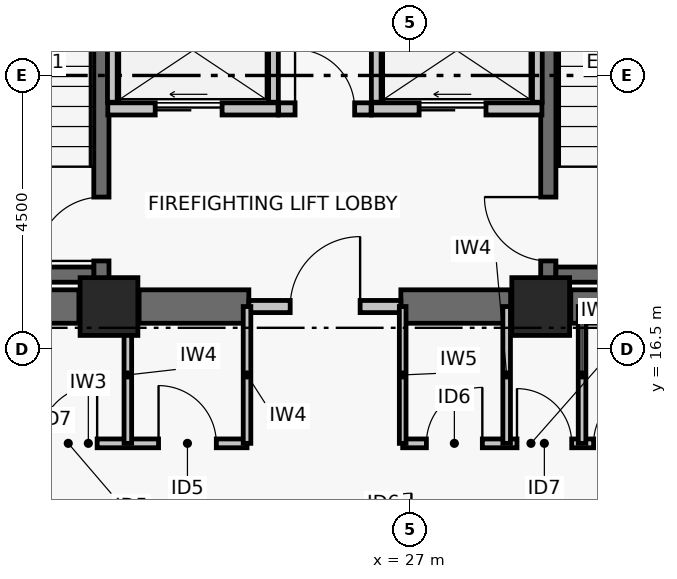
"""IFC4 building model, lengths in metres.
Left out: names, types, materials, properties, quantities, classifications, styles, units other than length and angle.
Written with IfcOpenShell. Run it as: python <this file> out.ifc"""

import sys

from ifc_helpers import new_model, si_unit, direction, frame, frame_2d, origin, origin_2d, place, context, subcontext, project, spatial, rectangle, extrude, element, fill, save


model = new_model("IFC4")
c1 = context("Model", 3, precision=1e-05, world=origin(), true_north=direction((0.0, 1.0)))
c2 = subcontext(c1, "Body", "Model", "MODEL_VIEW")
j1 = project(units=[si_unit("LENGTHUNIT", "METRE"), si_unit("PLANEANGLEUNIT", "RADIAN")], contexts=[c1])
p1 = place(None, origin())
s1 = spatial("IfcSite", under=j1, at=p1, CompositionType="ELEMENT")
p2 = place(p1, origin())
s2 = spatial("IfcBuilding", under=s1, at=p2, CompositionType="ELEMENT")
p3 = place(p2, frame((0.0, 0.0, 165.48)))
s3 = spatial("IfcBuildingStorey", under=s2, at=p3, CompositionType="ELEMENT", Elevation=165.48)
for number, where, z_axis, x_axis in (
    (1, (22.05, 17.2, 0.0), (0.0, 0.0, 1.0), (1.0, 0.0, 0.0)),
    (2, (29.15, 17.2, 0.0), (0.0, 0.0, 1.0), (1.0, 0.0, 0.0)),
):
    element("IfcColumn", number, at=place(p3, frame(where, z_axis=z_axis, x_axis=x_axis)), inside=s3, PredefinedType="COLUMN", context=c2, shape_type="SweptSolid", body=[
        extrude(rectangle(XDim=0.95, YDim=0.95, at=origin_2d()), origin(), (0.0, 0.0, 1.0), 3.72),
    ])
p4 = place(p3, frame((18.295, 17.2, 0.0), z_axis=(0.0, 0.0, 1.0), x_axis=(1.0, 0.0, 0.0)))
e3 = element("IfcWall", 3, at=p4, inside=s3, PredefinedType="SHEAR", context=c2, shape_type="SweptSolid", body=[
    extrude(rectangle(XDim=3.26, YDim=0.55, at=frame_2d((1.63, 0.0))), origin(), (0.0, 0.0, 1.0), 3.5),
])
p5 = place(p3, frame((22.545, 17.2, 0.0), z_axis=(0.0, 0.0, 1.0), x_axis=(1.0, 0.0, 0.0)))
e4 = element("IfcWall", 4, at=p5, inside=s3, PredefinedType="SHEAR", context=c2, shape_type="SweptSolid", body=[
    extrude(rectangle(XDim=1.805, YDim=0.55, at=frame_2d((0.903, 0.0))), origin(), (0.0, 0.0, 1.0), 3.5),
])
p6 = place(p3, frame((26.85, 17.2, 0.0), z_axis=(0.0, 0.0, 1.0), x_axis=(1.0, 0.0, 0.0)))
e5 = element("IfcWall", 5, at=p6, inside=s3, PredefinedType="SHEAR", context=c2, shape_type="SweptSolid", body=[
    extrude(rectangle(XDim=1.805, YDim=0.55, at=frame_2d((0.902, 0.0))), origin(), (0.0, 0.0, 1.0), 3.5),
])
p7 = place(p3, frame((29.645, 17.2, 0.0), z_axis=(0.0, 0.0, 1.0), x_axis=(1.0, 0.0, 0.0)))
e6 = element("IfcWall", 6, at=p7, inside=s3, PredefinedType="SHEAR", context=c2, shape_type="SweptSolid", body=[
    extrude(rectangle(XDim=3.26, YDim=0.55, at=frame_2d((1.63, 0.0))), origin(), (0.0, 0.0, 1.0), 3.5),
])
p8 = place(p3, frame((21.925, 17.6, 0.0), z_axis=(0.0, 0.0, 1.0), x_axis=(0.0, 1.0, 0.0)))
e7 = element("IfcWall", 7, at=p8, inside=s3, PredefinedType="SHEAR", context=c2, shape_type="SweptSolid", body=[
    extrude(rectangle(XDim=8.8, YDim=0.25, at=frame_2d((4.4, 0.0))), origin(), (0.0, 0.0, 1.0), 3.5),
])
p9 = place(p8, frame((0.35, 0.0, 0.0)))
e8 = element("IfcOpeningElement", 8, at=p9, cuts=e7, PredefinedType="OPENING", context=c2, shape_type="SweptSolid", body=[
    extrude(rectangle(XDim=1.05, YDim=2.08, at=frame_2d((0.525, 1.04))), frame((0.0, 0.135, 0.0), z_axis=(0.0, -1.0, 0.0), x_axis=(1.0, 0.0, 0.0)), (0.0, 0.0, 1.0), 0.27),
])
p10 = place(p3, frame((18.329, 17.725, 0.0), z_axis=(0.0, 0.0, 1.0), x_axis=(1.0, 0.0, 0.0)))
e9 = element("IfcWall", 9, at=p10, inside=s3, PredefinedType="SHEAR", context=c2, shape_type="SweptSolid", body=[
    extrude(rectangle(XDim=3.471, YDim=0.25, at=frame_2d((1.735, 0.0))), origin(), (0.0, 0.0, 1.0), 3.5),
])
p11 = place(p3, frame((29.275, 17.6, 0.0), z_axis=(0.0, 0.0, 1.0), x_axis=(0.0, 1.0, 0.0)))
e10 = element("IfcWall", 10, at=p11, inside=s3, PredefinedType="SHEAR", context=c2, shape_type="SweptSolid", body=[
    extrude(rectangle(XDim=8.8, YDim=0.25, at=frame_2d((4.4, 0.0))), origin(), (0.0, 0.0, 1.0), 3.5),
])
p12 = place(p11, frame((0.35, 0.0, 0.0)))
e11 = element("IfcOpeningElement", 11, at=p12, cuts=e10, PredefinedType="OPENING", context=c2, shape_type="SweptSolid", body=[
    extrude(rectangle(XDim=1.05, YDim=2.08, at=frame_2d((0.525, 1.04))), frame((0.0, 0.135, 0.0), z_axis=(0.0, -1.0, 0.0), x_axis=(1.0, 0.0, 0.0)), (0.0, 0.0, 1.0), 0.27),
])
p13 = place(p3, frame((29.4, 17.725, 0.0), z_axis=(0.0, 0.0, 1.0), x_axis=(1.0, 0.0, 0.0)))
e12 = element("IfcWall", 12, at=p13, inside=s3, PredefinedType="SHEAR", context=c2, shape_type="SweptSolid", body=[
    extrude(rectangle(XDim=3.471, YDim=0.25, at=frame_2d((1.736, 0.0))), origin(), (0.0, 0.0, 1.0), 3.5),
])
p14 = place(p3, frame((24.35, 17.2, 0.0), z_axis=(0.0, 0.0, 1.0), x_axis=(1.0, 0.0, 0.0)))
e13 = element("IfcWall", 13, at=p14, inside=s3, PredefinedType="PARTITIONING", context=c2, shape_type="SweptSolid", body=[
    extrude(rectangle(XDim=2.5, YDim=0.2, at=frame_2d((1.25, 0.0))), origin(), (0.0, 0.0, 1.0), 2.63),
])
p15 = place(p14, frame((0.68, 0.0, 0.0)))
e14 = element("IfcOpeningElement", 14, at=p15, cuts=e13, PredefinedType="OPENING", context=c2, shape_type="SweptSolid", body=[
    extrude(rectangle(XDim=1.15, YDim=2.08, at=frame_2d((0.575, 1.04))), frame((0.0, 0.11, 0.0), z_axis=(0.0, -1.0, 0.0), x_axis=(1.0, 0.0, 0.0)), (0.0, 0.0, 1.0), 0.22),
])
p16 = place(p3, frame((24.84, 20.45, 0.0), z_axis=(0.0, 0.0, 1.0), x_axis=(1.0, 0.0, 0.0)))
e15 = element("IfcWall", 15, at=p16, inside=s3, PredefinedType="PARTITIONING", context=c2, shape_type="SweptSolid", body=[
    extrude(rectangle(XDim=1.52, YDim=0.2, at=frame_2d((0.76, 0.0))), origin(), (0.0, 0.0, 1.0), 3.5),
])
p17 = place(p16, frame((0.27, 0.0, 0.0)))
e16 = element("IfcOpeningElement", 16, at=p17, cuts=e15, PredefinedType="OPENING", context=c2, shape_type="SweptSolid", body=[
    extrude(rectangle(XDim=0.98, YDim=2.06, at=frame_2d((0.49, 1.03))), frame((0.0, 0.11, 0.0), z_axis=(0.0, -1.0, 0.0), x_axis=(1.0, 0.0, 0.0)), (0.0, 0.0, 1.0), 0.22),
])
p18 = place(p3, frame((22.03, 20.45, 0.0), z_axis=(0.0, 0.0, 1.0), x_axis=(1.0, 0.0, 0.0)))
e17 = element("IfcWall", 17, at=p18, inside=s3, PredefinedType="PARTITIONING", context=c2, shape_type="SweptSolid", body=[
    extrude(rectangle(XDim=2.8, YDim=0.2, at=frame_2d((1.4, 0.0))), origin(), (0.0, 0.0, 1.0), 3.5),
])
p19 = place(p18, frame((0.78, 0.0, 0.0)))
e18 = element("IfcOpeningElement", 18, at=p19, cuts=e17, PredefinedType="OPENING", context=c2, shape_type="SweptSolid", body=[
    extrude(rectangle(XDim=1.1, YDim=2.08, at=frame_2d((0.55, 1.04))), frame((0.0, 0.11, 0.0), z_axis=(0.0, -1.0, 0.0), x_axis=(1.0, 0.0, 0.0)), (0.0, 0.0, 1.0), 0.22),
])
p20 = place(p3, frame((26.37, 20.45, 0.0), z_axis=(0.0, 0.0, 1.0), x_axis=(1.0, 0.0, 0.0)))
e19 = element("IfcWall", 19, at=p20, inside=s3, PredefinedType="PARTITIONING", context=c2, shape_type="SweptSolid", body=[
    extrude(rectangle(XDim=2.8, YDim=0.2, at=frame_2d((1.4, 0.0))), origin(), (0.0, 0.0, 1.0), 3.5),
])
p21 = place(p20, frame((0.78, 0.0, 0.0)))
e20 = element("IfcOpeningElement", 20, at=p21, cuts=e19, PredefinedType="OPENING", context=c2, shape_type="SweptSolid", body=[
    extrude(rectangle(XDim=1.1, YDim=2.08, at=frame_2d((0.55, 1.04))), frame((0.0, 0.11, 0.0), z_axis=(0.0, -1.0, 0.0), x_axis=(1.0, 0.0, 0.0)), (0.0, 0.0, 1.0), 0.22),
])
for number, where, z_axis, x_axis in (
    (21, (22.105, 20.56, 0.0), (0.0, 0.0, 1.0), (0.0, 1.0, 0.0)),
    (22, (24.755, 20.56, 0.0), (0.0, 0.0, 1.0), (0.0, 1.0, 0.0)),
):
    element("IfcWall", number, at=place(p3, frame(where, z_axis=z_axis, x_axis=x_axis)), inside=s3, PredefinedType="PARTITIONING", context=c2, shape_type="SweptSolid", body=[
        extrude(rectangle(XDim=1.71, YDim=0.16, at=frame_2d((0.855, 0.0))), origin(), (0.0, 0.0, 1.0), 3.5),
    ])
p22 = place(p3, frame((29.095, 20.56, 0.0), z_axis=(0.0, 0.0, 1.0), x_axis=(0.0, 1.0, 0.0)))
e23 = element("IfcWall", 23, at=p22, inside=s3, PredefinedType="PARTITIONING", context=c2, shape_type="SweptSolid", body=[
    extrude(rectangle(XDim=5.45, YDim=0.16, at=frame_2d((2.725, 0.0))), origin(), (0.0, 0.0, 1.0), 3.5),
])
p23 = place(p3, frame((26.445, 20.56, 0.0), z_axis=(0.0, 0.0, 1.0), x_axis=(0.0, 1.0, 0.0)))
e24 = element("IfcWall", 24, at=p23, inside=s3, PredefinedType="PARTITIONING", context=c2, shape_type="SweptSolid", body=[
    extrude(rectangle(XDim=1.71, YDim=0.16, at=frame_2d((0.855, 0.0))), origin(), (0.0, 0.0, 1.0), 3.5),
])
p24 = place(p3, frame((19.1, 14.95, 0.0), z_axis=(0.0, 0.0, 1.0), x_axis=(1.0, 0.0, 0.0)))
e25 = element("IfcWall", 25, at=p24, inside=s3, PredefinedType="PARTITIONING", context=c2, shape_type="SweptSolid", body=[
    extrude(rectangle(XDim=5.22, YDim=0.145, at=frame_2d((2.61, 0.0))), origin(), (0.0, 0.0, 1.0), 2.73),
])
p25 = place(p24, frame((0.2, 0.0, 0.0)))
e26 = element("IfcOpeningElement", 26, at=p25, cuts=e25, PredefinedType="OPENING", context=c2, shape_type="SweptSolid", body=[
    extrude(rectangle(XDim=0.9, YDim=2.02, at=frame_2d((0.45, 1.01))), frame((0.0, 0.083, 0.0), z_axis=(0.0, -1.0, 0.0), x_axis=(1.0, 0.0, 0.0)), (0.0, 0.0, 1.0), 0.165),
])
p26 = place(p24, frame((1.805, 0.0, 0.0)))
e27 = element("IfcOpeningElement", 27, at=p26, cuts=e25, PredefinedType="OPENING", context=c2, shape_type="SweptSolid", body=[
    extrude(rectangle(XDim=0.95, YDim=2.06, at=frame_2d((0.475, 1.03))), frame((0.0, 0.083, 0.0), z_axis=(0.0, -1.0, 0.0), x_axis=(1.0, 0.0, 0.0)), (0.0, 0.0, 1.0), 0.165),
])
p27 = place(p24, frame((3.765, 0.0, 0.0)))
e28 = element("IfcOpeningElement", 28, at=p27, cuts=e25, PredefinedType="OPENING", context=c2, shape_type="SweptSolid", body=[
    extrude(rectangle(XDim=0.95, YDim=2.06, at=frame_2d((0.475, 1.03))), frame((0.0, 0.083, 0.0), z_axis=(0.0, -1.0, 0.0), x_axis=(1.0, 0.0, 0.0)), (0.0, 0.0, 1.0), 0.165),
])
p28 = place(p3, frame((26.88, 14.95, 0.0), z_axis=(0.0, 0.0, 1.0), x_axis=(1.0, 0.0, 0.0)))
e29 = element("IfcWall", 29, at=p28, inside=s3, PredefinedType="PARTITIONING", context=c2, shape_type="SweptSolid", body=[
    extrude(rectangle(XDim=4.22, YDim=0.145, at=frame_2d((2.11, 0.0))), origin(), (0.0, 0.0, 1.0), 2.93),
])
p29 = place(p28, frame((0.39, 0.0, 0.0)))
e30 = element("IfcOpeningElement", 30, at=p29, cuts=e29, PredefinedType="OPENING", context=c2, shape_type="SweptSolid", body=[
    extrude(rectangle(XDim=0.92, YDim=2.05, at=frame_2d((0.46, 1.025))), frame((0.0, 0.083, 0.0), z_axis=(0.0, -1.0, 0.0), x_axis=(1.0, 0.0, 0.0)), (0.0, 0.0, 1.0), 0.165),
])
p30 = place(p28, frame((1.88, 0.0, 0.0)))
e31 = element("IfcOpeningElement", 31, at=p30, cuts=e29, PredefinedType="OPENING", context=c2, shape_type="SweptSolid", body=[
    extrude(rectangle(XDim=0.9, YDim=2.02, at=frame_2d((0.45, 1.01))), frame((0.0, 0.083, 0.0), z_axis=(0.0, -1.0, 0.0), x_axis=(1.0, 0.0, 0.0)), (0.0, 0.0, 1.0), 0.165),
])
p31 = place(p28, frame((3.14, 0.0, 0.0)))
e32 = element("IfcOpeningElement", 32, at=p31, cuts=e29, PredefinedType="OPENING", context=c2, shape_type="SweptSolid", body=[
    extrude(rectangle(XDim=0.9, YDim=2.02, at=frame_2d((0.45, 1.01))), frame((0.0, 0.083, 0.0), z_axis=(0.0, -1.0, 0.0), x_axis=(1.0, 0.0, 0.0)), (0.0, 0.0, 1.0), 0.165),
])
for number, where, z_axis, x_axis in (
    (33, (22.36, 14.95, 0.0), (0.0, 0.0, 1.0), (0.0, 1.0, 0.0)),
    (34, (24.32, 14.95, 0.0), (0.0, 0.0, 1.0), (0.0, 1.0, 0.0)),
):
    element("IfcWall", number, at=place(p3, frame(where, z_axis=z_axis, x_axis=x_axis)), inside=s3, PredefinedType="PARTITIONING", context=c2, shape_type="SweptSolid", body=[
        extrude(rectangle(XDim=2.25, YDim=0.125, at=frame_2d((1.125, 0.0))), origin(), (0.0, 0.0, 1.0), 2.63),
    ])
p32 = place(p3, frame((26.88, 14.95, 0.0), z_axis=(0.0, 0.0, 1.0), x_axis=(0.0, 1.0, 0.0)))
e35 = element("IfcWall", 35, at=p32, inside=s3, PredefinedType="PARTITIONING", context=c2, shape_type="SweptSolid", body=[
    extrude(rectangle(XDim=2.25, YDim=0.11, at=frame_2d((1.125, 0.0))), origin(), (0.0, 0.0, 1.0), 2.63),
])
for number, where, z_axis, x_axis in (
    (36, (28.59, 14.95, 0.0), (0.0, 0.0, 1.0), (0.0, 1.0, 0.0)),
    (37, (29.83, 14.95, 0.0), (0.0, 0.0, 1.0), (0.0, 1.0, 0.0)),
):
    element("IfcWall", number, at=place(p3, frame(where, z_axis=z_axis, x_axis=x_axis)), inside=s3, PredefinedType="PARTITIONING", context=c2, shape_type="SweptSolid", body=[
        extrude(rectangle(XDim=2.25, YDim=0.125, at=frame_2d((1.125, 0.0))), origin(), (0.0, 0.0, 1.0), 2.63),
    ])
p33 = place(p9, origin())
e38 = element("IfcDoor", 38, at=p33, inside=s3, OperationType="SINGLE_SWING_LEFT", PredefinedType="DOOR", context=c2, shape_type="SweptSolid", body=[
    extrude(rectangle(XDim=1.05, YDim=2.08, at=frame_2d((0.525, 1.04))), frame((0.0, 0.025, 0.0), z_axis=(0.0, -1.0, 0.0), x_axis=(1.0, 0.0, 0.0)), (0.0, 0.0, 1.0), 0.05),
])
fill(e8, e38)
p34 = place(p12, origin())
e39 = element("IfcDoor", 39, at=p34, inside=s3, OperationType="SINGLE_SWING_RIGHT", PredefinedType="DOOR", context=c2, shape_type="SweptSolid", body=[
    extrude(rectangle(XDim=1.05, YDim=2.08, at=frame_2d((0.525, 1.04))), frame((0.0, 0.025, 0.0), z_axis=(0.0, -1.0, 0.0), x_axis=(1.0, 0.0, 0.0)), (0.0, 0.0, 1.0), 0.05),
])
fill(e11, e39)
p35 = place(p15, origin())
e40 = element("IfcDoor", 40, at=p35, inside=s3, OperationType="SINGLE_SWING_RIGHT", PredefinedType="DOOR", context=c2, shape_type="SweptSolid", body=[
    extrude(rectangle(XDim=1.15, YDim=2.08, at=frame_2d((0.575, 1.04))), frame((0.0, 0.025, 0.0), z_axis=(0.0, -1.0, 0.0), x_axis=(1.0, 0.0, 0.0)), (0.0, 0.0, 1.0), 0.05),
])
fill(e14, e40)
p36 = place(p17, origin())
e41 = element("IfcDoor", 41, at=p36, inside=s3, OperationType="SINGLE_SWING_LEFT", PredefinedType="DOOR", context=c2, shape_type="SweptSolid", body=[
    extrude(rectangle(XDim=0.98, YDim=2.06, at=frame_2d((0.49, 1.03))), frame((0.0, 0.025, 0.0), z_axis=(0.0, -1.0, 0.0), x_axis=(1.0, 0.0, 0.0)), (0.0, 0.0, 1.0), 0.05),
])
fill(e16, e41)
p37 = place(p19, origin())
e42 = element("IfcDoor", 42, at=p37, inside=s3, OperationType="DOUBLE_DOOR_SLIDING", PredefinedType="DOOR", context=c2, shape_type="SweptSolid", body=[
    extrude(rectangle(XDim=1.1, YDim=2.08, at=frame_2d((0.55, 1.04))), frame((0.0, 0.025, 0.0), z_axis=(0.0, -1.0, 0.0), x_axis=(1.0, 0.0, 0.0)), (0.0, 0.0, 1.0), 0.05),
])
fill(e18, e42)
p38 = place(p21, origin())
e43 = element("IfcDoor", 43, at=p38, inside=s3, OperationType="DOUBLE_DOOR_SLIDING", PredefinedType="DOOR", context=c2, shape_type="SweptSolid", body=[
    extrude(rectangle(XDim=1.1, YDim=2.08, at=frame_2d((0.55, 1.04))), frame((0.0, 0.025, 0.0), z_axis=(0.0, -1.0, 0.0), x_axis=(1.0, 0.0, 0.0)), (0.0, 0.0, 1.0), 0.05),
])
fill(e20, e43)
p39 = place(p26, origin())
e44 = element("IfcDoor", 44, at=p39, inside=s3, OperationType="SINGLE_SWING_RIGHT", PredefinedType="DOOR", context=c2, shape_type="SweptSolid", body=[
    extrude(rectangle(XDim=0.95, YDim=2.06, at=frame_2d((0.475, 1.03))), frame((0.0, 0.025, 0.0), z_axis=(0.0, -1.0, 0.0), x_axis=(1.0, 0.0, 0.0)), (0.0, 0.0, 1.0), 0.05),
])
fill(e27, e44)
p40 = place(p27, origin())
e45 = element("IfcDoor", 45, at=p40, inside=s3, OperationType="SINGLE_SWING_LEFT", PredefinedType="DOOR", context=c2, shape_type="SweptSolid", body=[
    extrude(rectangle(XDim=0.95, YDim=2.06, at=frame_2d((0.475, 1.03))), frame((0.0, 0.025, 0.0), z_axis=(0.0, -1.0, 0.0), x_axis=(1.0, 0.0, 0.0)), (0.0, 0.0, 1.0), 0.05),
])
fill(e28, e45)
p41 = place(p29, origin())
e46 = element("IfcDoor", 46, at=p41, inside=s3, OperationType="SINGLE_SWING_RIGHT", PredefinedType="DOOR", context=c2, shape_type="SweptSolid", body=[
    extrude(rectangle(XDim=0.92, YDim=2.05, at=frame_2d((0.46, 1.025))), frame((0.0, 0.025, 0.0), z_axis=(0.0, -1.0, 0.0), x_axis=(1.0, 0.0, 0.0)), (0.0, 0.0, 1.0), 0.05),
])
fill(e30, e46)
p42 = place(p30, origin())
e47 = element("IfcDoor", 47, at=p42, inside=s3, OperationType="SINGLE_SWING_LEFT", PredefinedType="DOOR", context=c2, shape_type="SweptSolid", body=[
    extrude(rectangle(XDim=0.9, YDim=2.02, at=frame_2d((0.45, 1.01))), frame((0.0, 0.025, 0.0), z_axis=(0.0, -1.0, 0.0), x_axis=(1.0, 0.0, 0.0)), (0.0, 0.0, 1.0), 0.05),
])
fill(e31, e47)
p43 = place(p31, origin())
e48 = element("IfcDoor", 48, at=p43, inside=s3, OperationType="SINGLE_SWING_RIGHT", PredefinedType="DOOR", context=c2, shape_type="SweptSolid", body=[
    extrude(rectangle(XDim=0.9, YDim=2.02, at=frame_2d((0.45, 1.01))), frame((0.0, 0.025, 0.0), z_axis=(0.0, -1.0, 0.0), x_axis=(1.0, 0.0, 0.0)), (0.0, 0.0, 1.0), 0.05),
])
fill(e32, e48)
save(model, sys.argv[1])
